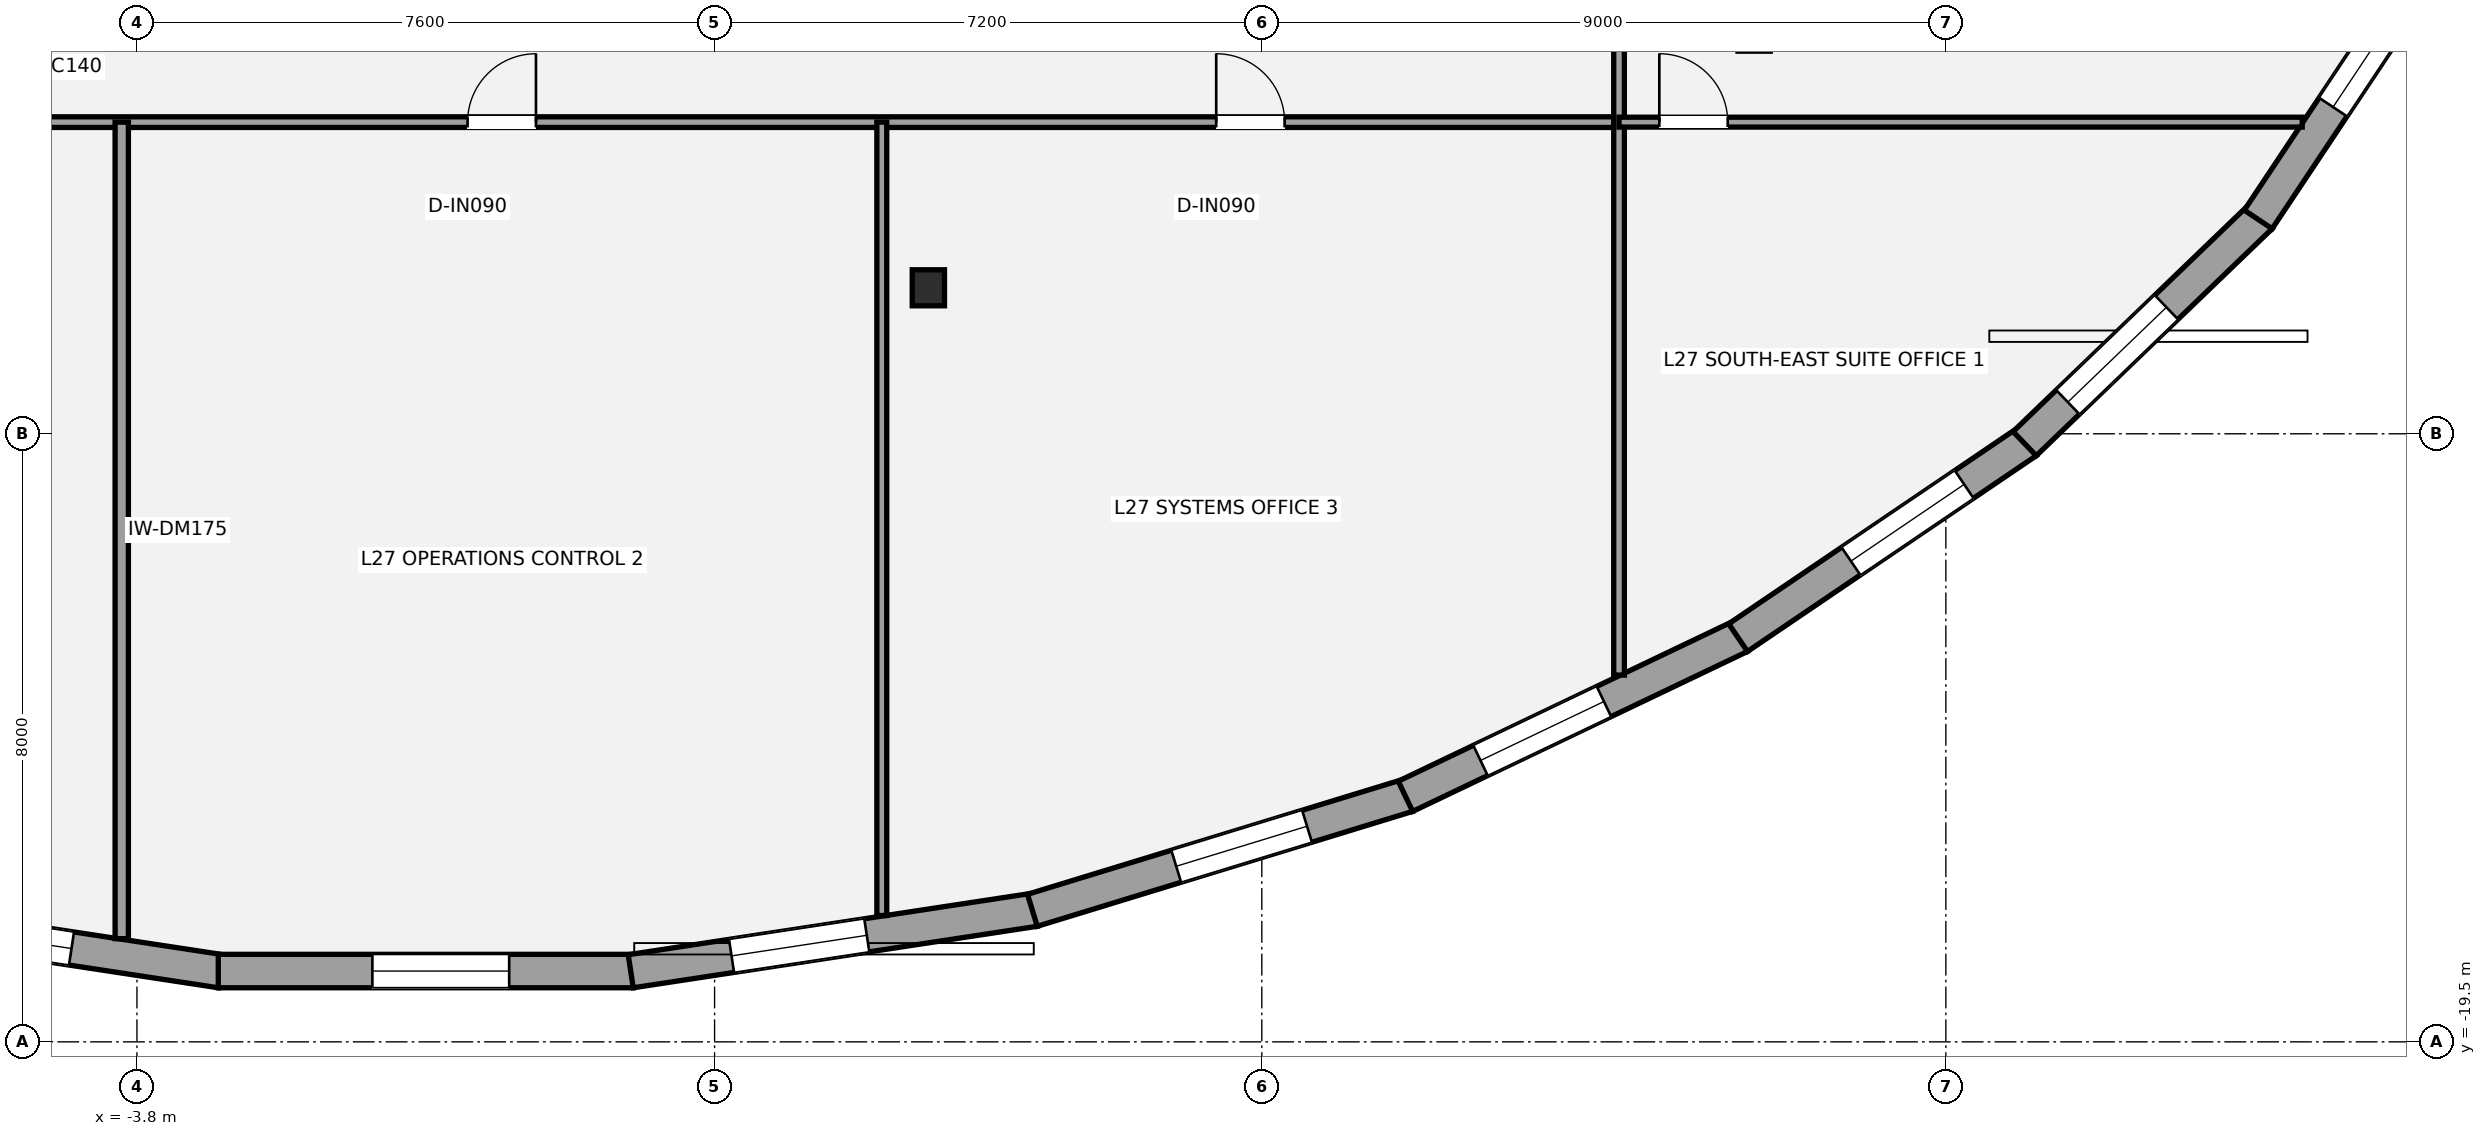
"""IFC4 building model, lengths in metres.
Left out: names, types, materials, properties, quantities, classifications, styles, units other than length and angle.
Written with IfcOpenShell. Run it as: python <this file> out.ifc"""

import sys

from ifc_helpers import new_model, si_unit, direction, frame, frame_2d, origin, origin_2d, place, context, subcontext, project, spatial, rectangle, i_section, extrude, element, fill, save


model = new_model("IFC4")
c1 = context("Model", 3, precision=1e-05, world=origin(), true_north=direction((0.0, 1.0)))
c2 = subcontext(c1, "Body", "Model", "MODEL_VIEW")
j1 = project(units=[si_unit("LENGTHUNIT", "METRE"), si_unit("PLANEANGLEUNIT", "RADIAN")], contexts=[c1])
p1 = place(None, origin())
s1 = spatial("IfcSite", under=j1, at=p1, CompositionType="ELEMENT")
p2 = place(p1, origin())
s2 = spatial("IfcBuilding", under=s1, at=p2, CompositionType="ELEMENT")
p3 = place(p2, frame((0.0, 0.0, 103.6)))
s3 = spatial("IfcBuildingStorey", under=s2, at=p3, CompositionType="ELEMENT", Elevation=103.6)
p4 = place(p3, frame((6.613, -9.579, 0.0), z_axis=(0.0, 0.0, 1.0), x_axis=(1.0, 0.0, 0.0)))
e1 = element("IfcColumn", 1, at=p4, inside=s3, PredefinedType="COLUMN", context=c2, shape_type="SweptSolid", body=[
    extrude(i_section(OverallWidth=0.424, OverallDepth=0.474, WebThickness=0.048, FlangeThickness=0.077, at=origin_2d()), origin(), (0.0, 0.0, 1.0), 3.5),
])
p5 = place(p3, frame((-2.697, -18.571, 0.0), z_axis=(0.0, 0.0, 1.0), x_axis=(-0.988627497469, 0.150385076545, 0.0)))
e2 = element("IfcWall", 2, at=p5, inside=s3, PredefinedType="STANDARD", context=c2, shape_type="SweptSolid", body=[
    extrude(rectangle(XDim=5.377, YDim=0.44, at=frame_2d((2.688, 0.0))), origin(), (0.0, 0.0, 1.0), 2.528),
])
p6 = place(p5, frame((1.987, 0.0, 0.65)))
e3 = element("IfcOpeningElement", 3, at=p6, cuts=e2, PredefinedType="OPENING", context=c2, shape_type="SweptSolid", body=[
    extrude(rectangle(XDim=1.8, YDim=1.7, at=frame_2d((0.9, 0.85))), frame((0.0, 0.23, 0.0), z_axis=(0.0, -1.0, 0.0), x_axis=(1.0, 0.0, 0.0)), (0.0, 0.0, 1.0), 0.46),
])
p7 = place(p3, frame((2.73, -18.568, 0.0), z_axis=(0.0, 0.0, 1.0), x_axis=(-1.0, 0.0, 0.0)))
e4 = element("IfcWall", 4, at=p7, inside=s3, PredefinedType="STANDARD", context=c2, shape_type="SweptSolid", body=[
    extrude(rectangle(XDim=5.459, YDim=0.44, at=frame_2d((2.73, 0.0))), origin(), (0.0, 0.0, 1.0), 2.528),
])
p8 = place(p7, frame((1.632, 0.0, 0.65)))
e5 = element("IfcOpeningElement", 5, at=p8, cuts=e4, PredefinedType="OPENING", context=c2, shape_type="SweptSolid", body=[
    extrude(rectangle(XDim=1.8, YDim=1.7, at=frame_2d((0.9, 0.85))), frame((0.0, 0.23, 0.0), z_axis=(0.0, -1.0, 0.0), x_axis=(1.0, 0.0, 0.0)), (0.0, 0.0, 1.0), 0.46),
])
p9 = place(p3, frame((8.012, -17.762, 0.0), z_axis=(0.0, 0.0, 1.0), x_axis=(-0.988627497469, -0.150385076545, 0.0)))
e6 = element("IfcWall", 6, at=p9, inside=s3, PredefinedType="STANDARD", context=c2, shape_type="SweptSolid", body=[
    extrude(rectangle(XDim=5.377, YDim=0.44, at=frame_2d((2.688, 0.0))), origin(), (0.0, 0.0, 1.0), 2.528),
])
p10 = place(p9, frame((2.235, 0.0, 0.65)))
e7 = element("IfcOpeningElement", 7, at=p10, cuts=e6, PredefinedType="OPENING", context=c2, shape_type="SweptSolid", body=[
    extrude(rectangle(XDim=1.8, YDim=1.7, at=frame_2d((0.9, 0.85))), frame((0.0, 0.23, 0.0), z_axis=(0.0, -1.0, 0.0), x_axis=(1.0, 0.0, 0.0)), (0.0, 0.0, 1.0), 0.46),
])
p11 = place(p3, frame((12.92, -16.258, 0.0), z_axis=(0.0, 0.0, 1.0), x_axis=(-0.956228569431, -0.292620783617, 0.0)))
e8 = element("IfcWall", 8, at=p11, inside=s3, PredefinedType="STANDARD", context=c2, shape_type="SweptSolid", body=[
    extrude(rectangle(XDim=5.165, YDim=0.44, at=frame_2d((2.583, 0.0))), origin(), (0.0, 0.0, 1.0), 2.528),
])
p12 = place(p11, frame((1.386, 0.0, 0.65)))
e9 = element("IfcOpeningElement", 9, at=p12, cuts=e8, PredefinedType="OPENING", context=c2, shape_type="SweptSolid", body=[
    extrude(rectangle(XDim=1.8, YDim=1.7, at=frame_2d((0.9, 0.85))), frame((0.0, 0.23, 0.0), z_axis=(0.0, -1.0, 0.0), x_axis=(1.0, 0.0, 0.0)), (0.0, 0.0, 1.0), 0.46),
])
p13 = place(p3, frame((17.295, -14.166, 0.0), z_axis=(0.0, 0.0, 1.0), x_axis=(-0.902372757907, -0.430956385018, 0.0)))
e10 = element("IfcWall", 10, at=p13, inside=s3, PredefinedType="STANDARD", context=c2, shape_type="SweptSolid", body=[
    extrude(rectangle(XDim=4.882, YDim=0.44, at=frame_2d((2.441, 0.0))), origin(), (0.0, 0.0, 1.0), 2.528),
])
p14 = place(p13, frame((1.988, 0.0, 0.65)))
e11 = element("IfcOpeningElement", 11, at=p14, cuts=e10, PredefinedType="OPENING", context=c2, shape_type="SweptSolid", body=[
    extrude(rectangle(XDim=1.8, YDim=1.7, at=frame_2d((0.9, 0.85))), frame((0.0, 0.23, 0.0), z_axis=(0.0, -1.0, 0.0), x_axis=(1.0, 0.0, 0.0)), (0.0, 0.0, 1.0), 0.46),
])
p15 = place(p3, frame((21.066, -11.606, 0.0), z_axis=(0.0, 0.0, 1.0), x_axis=(-0.827754551165, -0.56109036975, 0.0)))
e12 = element("IfcWall", 12, at=p15, inside=s3, PredefinedType="STANDARD", context=c2, shape_type="SweptSolid", body=[
    extrude(rectangle(XDim=4.591, YDim=0.44, at=frame_2d((2.295, 0.0))), origin(), (0.0, 0.0, 1.0), 2.528),
])
p16 = place(p15, frame((0.997, 0.0, 0.65)))
e13 = element("IfcOpeningElement", 13, at=p16, cuts=e12, PredefinedType="OPENING", context=c2, shape_type="SweptSolid", body=[
    extrude(rectangle(XDim=1.8, YDim=1.7, at=frame_2d((0.9, 0.85))), frame((0.0, 0.23, 0.0), z_axis=(0.0, -1.0, 0.0), x_axis=(1.0, 0.0, 0.0)), (0.0, 0.0, 1.0), 0.46),
])
p17 = place(p3, frame((24.14, -8.644, 0.0), z_axis=(0.0, 0.0, 1.0), x_axis=(-0.720581378362, -0.693370375166, 0.0)))
e14 = element("IfcWall", 14, at=p17, inside=s3, PredefinedType="STANDARD", context=c2, shape_type="SweptSolid", body=[
    extrude(rectangle(XDim=4.307, YDim=0.44, at=frame_2d((2.153, 0.0))), origin(), (0.0, 0.0, 1.0), 2.528),
])
p18 = place(p17, frame((1.719, 0.0, 0.65)))
e15 = element("IfcOpeningElement", 15, at=p18, cuts=e14, PredefinedType="OPENING", context=c2, shape_type="SweptSolid", body=[
    extrude(rectangle(XDim=1.8, YDim=1.7, at=frame_2d((0.9, 0.85))), frame((0.0, 0.23, 0.0), z_axis=(0.0, -1.0, 0.0), x_axis=(1.0, 0.0, 0.0)), (0.0, 0.0, 1.0), 0.46),
])
p19 = place(p3, frame((26.34, -5.332, 0.0), z_axis=(0.0, 0.0, 1.0), x_axis=(-0.554293965046, -0.83232097193, 0.0)))
e16 = element("IfcWall", 16, at=p19, inside=s3, PredefinedType="STANDARD", context=c2, shape_type="SweptSolid", body=[
    extrude(rectangle(XDim=4.023, YDim=0.44, at=frame_2d((2.011, 0.0))), origin(), (0.0, 0.0, 1.0), 2.528),
])
p20 = place(p19, frame((0.446, 0.0, 0.65)))
e17 = element("IfcOpeningElement", 17, at=p20, cuts=e16, PredefinedType="OPENING", context=c2, shape_type="SweptSolid", body=[
    extrude(rectangle(XDim=1.8, YDim=1.7, at=frame_2d((0.9, 0.85))), frame((0.0, 0.23, 0.0), z_axis=(0.0, -1.0, 0.0), x_axis=(1.0, 0.0, 0.0)), (0.0, 0.0, 1.0), 0.46),
])
p21 = place(p3, frame((-17.5, -7.4, 0.0), z_axis=(0.0, 0.0, 1.0), x_axis=(1.0, 0.0, 0.0)))
e18 = element("IfcWall", 18, at=p21, inside=s3, PredefinedType="PARTITIONING", context=c2, shape_type="SweptSolid", body=[
    extrude(rectangle(XDim=33.2, YDim=0.14, at=frame_2d((16.6, 0.0))), origin(), (0.0, 0.0, 1.0), 2.688),
])
p22 = place(p21, frame((6.3, 0.0, 0.0)))
e19 = element("IfcOpeningElement", 19, at=p22, cuts=e18, PredefinedType="OPENING", context=c2, shape_type="SweptSolid", body=[
    extrude(rectangle(XDim=0.9, YDim=2.1, at=frame_2d((0.45, 1.05))), frame((0.0, 0.08, 0.0), z_axis=(0.0, -1.0, 0.0), x_axis=(1.0, 0.0, 0.0)), (0.0, 0.0, 1.0), 0.16),
])
p23 = place(p21, frame((18.05, 0.0, 0.0)))
e20 = element("IfcOpeningElement", 20, at=p23, cuts=e18, PredefinedType="OPENING", context=c2, shape_type="SweptSolid", body=[
    extrude(rectangle(XDim=0.9, YDim=2.1, at=frame_2d((0.45, 1.05))), frame((0.0, 0.08, 0.0), z_axis=(0.0, -1.0, 0.0), x_axis=(1.0, 0.0, 0.0)), (0.0, 0.0, 1.0), 0.16),
])
p24 = place(p21, frame((27.9, 0.0, 0.0)))
e21 = element("IfcOpeningElement", 21, at=p24, cuts=e18, PredefinedType="OPENING", context=c2, shape_type="SweptSolid", body=[
    extrude(rectangle(XDim=0.9, YDim=2.1, at=frame_2d((0.45, 1.05))), frame((0.0, 0.08, 0.0), z_axis=(0.0, -1.0, 0.0), x_axis=(1.0, 0.0, 0.0)), (0.0, 0.0, 1.0), 0.16),
])
p25 = place(p3, frame((15.7, -14.675, 0.0), z_axis=(0.0, 0.0, 1.0), x_axis=(0.0, 1.0, 0.0)))
e22 = element("IfcWall", 22, at=p25, inside=s3, PredefinedType="PARTITIONING", context=c2, shape_type="SweptSolid", body=[
    extrude(rectangle(XDim=22.225, YDim=0.14, at=frame_2d((11.112, 0.0))), origin(), (0.0, 0.0, 1.0), 2.763),
])
p26 = place(p25, frame((9.325, 0.0, 0.0)))
e23 = element("IfcOpeningElement", 23, at=p26, cuts=e22, PredefinedType="OPENING", context=c2, shape_type="SweptSolid", body=[
    extrude(rectangle(XDim=0.9, YDim=2.1, at=frame_2d((0.45, 1.05))), frame((0.0, 0.08, 0.0), z_axis=(0.0, -1.0, 0.0), x_axis=(1.0, 0.0, 0.0)), (0.0, 0.0, 1.0), 0.16),
])
p27 = place(p25, frame((13.525, 0.0, 0.0)))
e24 = element("IfcOpeningElement", 24, at=p27, cuts=e22, PredefinedType="OPENING", context=c2, shape_type="SweptSolid", body=[
    extrude(rectangle(XDim=0.9, YDim=2.1, at=frame_2d((0.45, 1.05))), frame((0.0, 0.08, 0.0), z_axis=(0.0, -1.0, 0.0), x_axis=(1.0, 0.0, 0.0)), (0.0, 0.0, 1.0), 0.16),
])
p28 = place(p25, frame((16.925, 0.0, 0.0)))
e25 = element("IfcOpeningElement", 25, at=p28, cuts=e22, PredefinedType="OPENING", context=c2, shape_type="SweptSolid", body=[
    extrude(rectangle(XDim=0.9, YDim=2.1, at=frame_2d((0.45, 1.05))), frame((0.0, 0.08, 0.0), z_axis=(0.0, -1.0, 0.0), x_axis=(1.0, 0.0, 0.0)), (0.0, 0.0, 1.0), 0.16),
])
p29 = place(p25, frame((20.2, 0.0, 0.0)))
e26 = element("IfcOpeningElement", 26, at=p29, cuts=e22, PredefinedType="OPENING", context=c2, shape_type="SweptSolid", body=[
    extrude(rectangle(XDim=0.9, YDim=2.1, at=frame_2d((0.45, 1.05))), frame((0.0, 0.08, 0.0), z_axis=(0.0, -1.0, 0.0), x_axis=(1.0, 0.0, 0.0)), (0.0, 0.0, 1.0), 0.16),
])
p30 = place(p3, frame((-4.0, -18.142, 0.0), z_axis=(0.0, 0.0, 1.0), x_axis=(0.0, 1.0, 0.0)))
e27 = element("IfcWall", 27, at=p30, inside=s3, PredefinedType="PARTITIONING", context=c2, shape_type="SweptSolid", body=[
    extrude(rectangle(XDim=10.742, YDim=0.175, at=frame_2d((5.371, 0.0))), origin(), (0.0, 0.0, 1.0), 2.763),
])
p31 = place(p3, frame((6.0, -17.838, 0.0), z_axis=(0.0, 0.0, 1.0), x_axis=(0.0, 1.0, 0.0)))
e28 = element("IfcWall", 28, at=p31, inside=s3, PredefinedType="PARTITIONING", context=c2, shape_type="SweptSolid", body=[
    extrude(rectangle(XDim=10.438, YDim=0.13, at=frame_2d((5.219, 0.0))), origin(), (0.0, 0.0, 1.0), 2.763),
])
p32 = place(p3, frame((15.7, -7.4, 0.0), z_axis=(0.0, 0.0, 1.0), x_axis=(1.0, 0.0, 0.0)))
e29 = element("IfcWall", 29, at=p32, inside=s3, PredefinedType="PARTITIONING", context=c2, shape_type="SweptSolid", body=[
    extrude(rectangle(XDim=8.989, YDim=0.13, at=frame_2d((4.494, 0.0))), origin(), (0.0, 0.0, 1.0), 2.763),
])
p33 = place(p32, frame((0.53, 0.0, 0.0)))
e30 = element("IfcOpeningElement", 30, at=p33, cuts=e29, PredefinedType="OPENING", context=c2, shape_type="SweptSolid", body=[
    extrude(rectangle(XDim=0.9, YDim=2.1, at=frame_2d((0.45, 1.05))), frame((0.0, 0.075, 0.0), z_axis=(0.0, -1.0, 0.0), x_axis=(1.0, 0.0, 0.0)), (0.0, 0.0, 1.0), 0.15),
])
p34 = place(p6, origin())
e31 = element("IfcWindow", 31, at=p34, inside=s3, PartitioningType="SINGLE_PANEL", PredefinedType="WINDOW", context=c2, shape_type="SweptSolid", body=[
    extrude(rectangle(XDim=1.8, YDim=1.7, at=frame_2d((0.9, 0.85))), frame((0.0, -0.01, 0.0), z_axis=(0.0, -1.0, 0.0), x_axis=(1.0, 0.0, 0.0)), (0.0, 0.0, 1.0), 0.06),
])
fill(e3, e31)
p35 = place(p8, origin())
e32 = element("IfcWindow", 32, at=p35, inside=s3, PartitioningType="SINGLE_PANEL", PredefinedType="WINDOW", context=c2, shape_type="SweptSolid", body=[
    extrude(rectangle(XDim=1.8, YDim=1.7, at=frame_2d((0.9, 0.85))), frame((0.0, -0.01, 0.0), z_axis=(0.0, -1.0, 0.0), x_axis=(1.0, 0.0, 0.0)), (0.0, 0.0, 1.0), 0.06),
])
fill(e5, e32)
p36 = place(p10, origin())
e33 = element("IfcWindow", 33, at=p36, inside=s3, PartitioningType="SINGLE_PANEL", PredefinedType="WINDOW", context=c2, shape_type="SweptSolid", body=[
    extrude(rectangle(XDim=1.8, YDim=1.7, at=frame_2d((0.9, 0.85))), frame((0.0, -0.01, 0.0), z_axis=(0.0, -1.0, 0.0), x_axis=(1.0, 0.0, 0.0)), (0.0, 0.0, 1.0), 0.06),
])
fill(e7, e33)
p37 = place(p12, origin())
e34 = element("IfcWindow", 34, at=p37, inside=s3, PartitioningType="SINGLE_PANEL", PredefinedType="WINDOW", context=c2, shape_type="SweptSolid", body=[
    extrude(rectangle(XDim=1.8, YDim=1.7, at=frame_2d((0.9, 0.85))), frame((0.0, -0.01, 0.0), z_axis=(0.0, -1.0, 0.0), x_axis=(1.0, 0.0, 0.0)), (0.0, 0.0, 1.0), 0.06),
])
fill(e9, e34)
p38 = place(p14, origin())
e35 = element("IfcWindow", 35, at=p38, inside=s3, PartitioningType="SINGLE_PANEL", PredefinedType="WINDOW", context=c2, shape_type="SweptSolid", body=[
    extrude(rectangle(XDim=1.8, YDim=1.7, at=frame_2d((0.9, 0.85))), frame((0.0, -0.01, 0.0), z_axis=(0.0, -1.0, 0.0), x_axis=(1.0, 0.0, 0.0)), (0.0, 0.0, 1.0), 0.06),
])
fill(e11, e35)
p39 = place(p16, origin())
e36 = element("IfcWindow", 36, at=p39, inside=s3, PartitioningType="SINGLE_PANEL", PredefinedType="WINDOW", context=c2, shape_type="SweptSolid", body=[
    extrude(rectangle(XDim=1.8, YDim=1.7, at=frame_2d((0.9, 0.85))), frame((0.0, -0.01, 0.0), z_axis=(0.0, -1.0, 0.0), x_axis=(1.0, 0.0, 0.0)), (0.0, 0.0, 1.0), 0.06),
])
fill(e13, e36)
p40 = place(p18, origin())
e37 = element("IfcWindow", 37, at=p40, inside=s3, PartitioningType="SINGLE_PANEL", PredefinedType="WINDOW", context=c2, shape_type="SweptSolid", body=[
    extrude(rectangle(XDim=1.8, YDim=1.7, at=frame_2d((0.9, 0.85))), frame((0.0, -0.01, 0.0), z_axis=(0.0, -1.0, 0.0), x_axis=(1.0, 0.0, 0.0)), (0.0, 0.0, 1.0), 0.06),
])
fill(e15, e37)
p41 = place(p20, origin())
e38 = element("IfcWindow", 38, at=p41, inside=s3, PartitioningType="SINGLE_PANEL", PredefinedType="WINDOW", context=c2, shape_type="SweptSolid", body=[
    extrude(rectangle(XDim=1.8, YDim=1.7, at=frame_2d((0.9, 0.85))), frame((0.0, -0.01, 0.0), z_axis=(0.0, -1.0, 0.0), x_axis=(1.0, 0.0, 0.0)), (0.0, 0.0, 1.0), 0.06),
])
fill(e17, e38)
p42 = place(p23, origin())
e39 = element("IfcDoor", 39, at=p42, inside=s3, OperationType="SINGLE_SWING_RIGHT", PredefinedType="DOOR", context=c2, shape_type="SweptSolid", body=[
    extrude(rectangle(XDim=0.9, YDim=2.1, at=frame_2d((0.45, 1.05))), frame((0.0, 0.025, 0.0), z_axis=(0.0, -1.0, 0.0), x_axis=(1.0, 0.0, 0.0)), (0.0, 0.0, 1.0), 0.05),
])
fill(e20, e39)
p43 = place(p24, origin())
e40 = element("IfcDoor", 40, at=p43, inside=s3, OperationType="SINGLE_SWING_LEFT", PredefinedType="DOOR", context=c2, shape_type="SweptSolid", body=[
    extrude(rectangle(XDim=0.9, YDim=2.1, at=frame_2d((0.45, 1.05))), frame((0.0, 0.025, 0.0), z_axis=(0.0, -1.0, 0.0), x_axis=(1.0, 0.0, 0.0)), (0.0, 0.0, 1.0), 0.05),
])
fill(e21, e40)
p44 = place(p33, origin())
e41 = element("IfcDoor", 41, at=p44, inside=s3, OperationType="SINGLE_SWING_LEFT", PredefinedType="DOOR", context=c2, shape_type="SweptSolid", body=[
    extrude(rectangle(XDim=0.9, YDim=2.1, at=frame_2d((0.45, 1.05))), frame((0.0, 0.025, 0.0), z_axis=(0.0, -1.0, 0.0), x_axis=(1.0, 0.0, 0.0)), (0.0, 0.0, 1.0), 0.05),
])
fill(e30, e41)
save(model, sys.argv[1])
